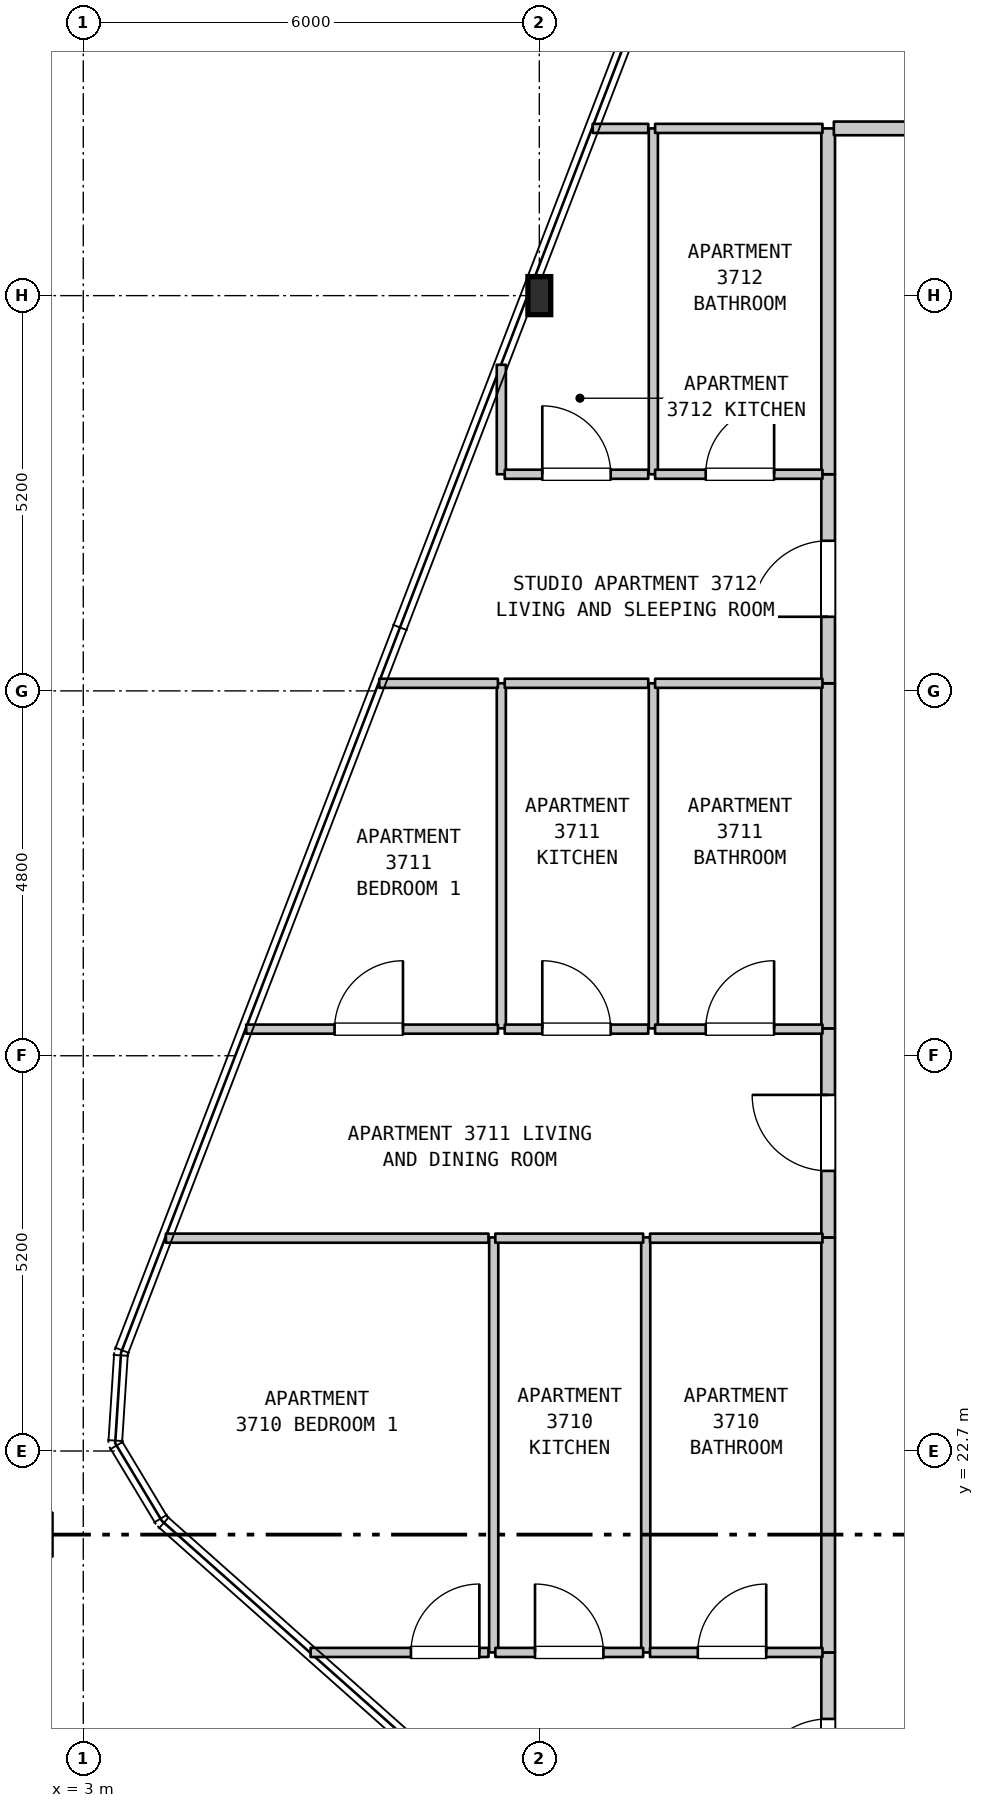
"""IFC4 building model, lengths in metres.
Left out: names, types, materials, properties, quantities, classifications, styles, units other than length and angle.
Written with IfcOpenShell. Run it as: python <this file> out.ifc"""

import sys

from ifc_helpers import new_model, si_unit, direction, frame, frame_2d, origin, origin_2d, place, context, subcontext, project, spatial, rectangle, i_section, extrude, element, fill, save


model = new_model("IFC4")
c1 = context("Model", 3, precision=1e-05, world=origin(), true_north=direction((0.0, 1.0)))
c2 = subcontext(c1, "Body", "Model", "MODEL_VIEW")
j1 = project(units=[si_unit("LENGTHUNIT", "METRE"), si_unit("PLANEANGLEUNIT", "RADIAN")], contexts=[c1])
p1 = place(None, origin())
s1 = spatial("IfcSite", under=j1, at=p1, CompositionType="ELEMENT")
p2 = place(p1, origin())
s2 = spatial("IfcBuilding", under=s1, at=p2, CompositionType="ELEMENT")
p3 = place(p2, frame((0.0, 0.0, 152.0)))
s3 = spatial("IfcBuildingStorey", under=s2, at=p3, CompositionType="ELEMENT", Elevation=152.0)
p4 = place(p3, frame((9.0, 37.9, 0.0), z_axis=(0.0, 0.0, 1.0), x_axis=(1.0, 0.0, 0.0)))
e1 = element("IfcColumn", 1, at=p4, inside=s3, PredefinedType="COLUMN", context=c2, shape_type="SweptSolid", body=[
    extrude(i_section(OverallWidth=0.3, OverallDepth=0.5, WebThickness=0.014, FlangeThickness=0.028, FilletRadius=0.027, at=origin_2d()), origin(), (0.0, 0.0, 1.0), 3.7),
])
p5 = place(p3, frame((8.4, 20.05, 0.0), z_axis=(0.0, 0.0, 1.0), x_axis=(0.0, 1.0, 0.0)))
e2 = element("IfcWall", 2, at=p5, inside=s3, PredefinedType="PARTITIONING", context=c2, shape_type="SweptSolid", body=[
    extrude(rectangle(XDim=5.46, YDim=0.12, at=frame_2d((2.73, 0.0))), origin(), (0.0, 0.0, 1.0), 3.385),
])
p6 = place(p3, frame((8.5, 28.26, 0.0), z_axis=(0.0, 0.0, 1.0), x_axis=(0.0, 1.0, 0.0)))
e3 = element("IfcWall", 3, at=p6, inside=s3, PredefinedType="PARTITIONING", context=c2, shape_type="SweptSolid", body=[
    extrude(rectangle(XDim=4.54, YDim=0.12, at=frame_2d((2.27, 0.0))), origin(), (0.0, 0.0, 1.0), 3.385),
])
p7 = place(p3, frame((8.5, 35.55, 0.0), z_axis=(0.0, 0.0, 1.0), x_axis=(0.0, 1.0, 0.0)))
e4 = element("IfcWall", 4, at=p7, inside=s3, PredefinedType="PARTITIONING", context=c2, shape_type="SweptSolid", body=[
    extrude(rectangle(XDim=1.44, YDim=0.12, at=frame_2d((0.72, 0.0))), origin(), (0.0, 0.0, 1.0), 3.385),
])
p8 = place(p3, frame((10.4, 20.05, 0.0), z_axis=(0.0, 0.0, 1.0), x_axis=(0.0, 1.0, 0.0)))
e5 = element("IfcWall", 5, at=p8, inside=s3, PredefinedType="PARTITIONING", context=c2, shape_type="SweptSolid", body=[
    extrude(rectangle(XDim=5.46, YDim=0.12, at=frame_2d((2.73, 0.0))), origin(), (0.0, 0.0, 1.0), 3.385),
])
p9 = place(p3, frame((10.5, 28.26, 0.0), z_axis=(0.0, 0.0, 1.0), x_axis=(0.0, 1.0, 0.0)))
e6 = element("IfcWall", 6, at=p9, inside=s3, PredefinedType="PARTITIONING", context=c2, shape_type="SweptSolid", body=[
    extrude(rectangle(XDim=4.54, YDim=0.12, at=frame_2d((2.27, 0.0))), origin(), (0.0, 0.0, 1.0), 3.385),
])
p10 = place(p3, frame((10.5, 35.55, 0.0), z_axis=(0.0, 0.0, 1.0), x_axis=(0.0, 1.0, 0.0)))
e7 = element("IfcWall", 7, at=p10, inside=s3, PredefinedType="PARTITIONING", context=c2, shape_type="SweptSolid", body=[
    extrude(rectangle(XDim=4.55, YDim=0.12, at=frame_2d((2.275, 0.0))), origin(), (0.0, 0.0, 1.0), 3.385),
])
p11 = place(p3, frame((12.8, 17.3, 0.0), z_axis=(0.0, 0.0, 1.0), x_axis=(0.0, 1.0, 0.0)))
e8 = element("IfcWall", 8, at=p11, inside=s3, PredefinedType="STANDARD", context=c2, shape_type="SweptSolid", body=[
    extrude(rectangle(XDim=2.75, YDim=0.18, at=frame_2d((1.375, 0.0))), origin(), (0.0, 0.0, 1.0), 3.385),
])
p12 = place(p11, frame((0.875, 0.0, 0.0)))
e9 = element("IfcOpeningElement", 9, at=p12, cuts=e8, PredefinedType="OPENING", context=c2, shape_type="SweptSolid", body=[
    extrude(rectangle(XDim=1.0, YDim=2.15, at=frame_2d((0.5, 1.075))), frame((0.0, 0.1, 0.0), z_axis=(0.0, -1.0, 0.0), x_axis=(1.0, 0.0, 0.0)), (0.0, 0.0, 1.0), 0.2),
])
p13 = place(p3, frame((12.8, 20.05, 0.0), z_axis=(0.0, 0.0, 1.0), x_axis=(0.0, 1.0, 0.0)))
e10 = element("IfcWall", 10, at=p13, inside=s3, PredefinedType="STANDARD", context=c2, shape_type="SweptSolid", body=[
    extrude(rectangle(XDim=5.46, YDim=0.18, at=frame_2d((2.73, 0.0))), origin(), (0.0, 0.0, 1.0), 3.385),
])
p14 = place(p3, frame((12.8, 25.51, 0.0), z_axis=(0.0, 0.0, 1.0), x_axis=(0.0, 1.0, 0.0)))
e11 = element("IfcWall", 11, at=p14, inside=s3, PredefinedType="STANDARD", context=c2, shape_type="SweptSolid", body=[
    extrude(rectangle(XDim=2.75, YDim=0.18, at=frame_2d((1.375, 0.0))), origin(), (0.0, 0.0, 1.0), 3.385),
])
p15 = place(p14, frame((0.875, 0.0, 0.0)))
e12 = element("IfcOpeningElement", 12, at=p15, cuts=e11, PredefinedType="OPENING", context=c2, shape_type="SweptSolid", body=[
    extrude(rectangle(XDim=1.0, YDim=2.15, at=frame_2d((0.5, 1.075))), frame((0.0, 0.1, 0.0), z_axis=(0.0, -1.0, 0.0), x_axis=(1.0, 0.0, 0.0)), (0.0, 0.0, 1.0), 0.2),
])
p16 = place(p3, frame((12.8, 28.26, 0.0), z_axis=(0.0, 0.0, 1.0), x_axis=(0.0, 1.0, 0.0)))
e13 = element("IfcWall", 13, at=p16, inside=s3, PredefinedType="STANDARD", context=c2, shape_type="SweptSolid", body=[
    extrude(rectangle(XDim=4.54, YDim=0.18, at=frame_2d((2.27, 0.0))), origin(), (0.0, 0.0, 1.0), 3.385),
])
p17 = place(p3, frame((12.8, 32.8, 0.0), z_axis=(0.0, 0.0, 1.0), x_axis=(0.0, 1.0, 0.0)))
e14 = element("IfcWall", 14, at=p17, inside=s3, PredefinedType="STANDARD", context=c2, shape_type="SweptSolid", body=[
    extrude(rectangle(XDim=2.75, YDim=0.18, at=frame_2d((1.375, 0.0))), origin(), (0.0, 0.0, 1.0), 3.385),
])
p18 = place(p17, frame((0.875, 0.0, 0.0)))
e15 = element("IfcOpeningElement", 15, at=p18, cuts=e14, PredefinedType="OPENING", context=c2, shape_type="SweptSolid", body=[
    extrude(rectangle(XDim=1.0, YDim=2.15, at=frame_2d((0.5, 1.075))), frame((0.0, 0.1, 0.0), z_axis=(0.0, -1.0, 0.0), x_axis=(1.0, 0.0, 0.0)), (0.0, 0.0, 1.0), 0.2),
])
p19 = place(p3, frame((12.8, 35.55, 0.0), z_axis=(0.0, 0.0, 1.0), x_axis=(0.0, 1.0, 0.0)))
e16 = element("IfcWall", 16, at=p19, inside=s3, PredefinedType="STANDARD", context=c2, shape_type="SweptSolid", body=[
    extrude(rectangle(XDim=4.55, YDim=0.18, at=frame_2d((2.275, 0.0))), origin(), (0.0, 0.0, 1.0), 3.385),
])
p20 = place(p3, frame((5.991, 20.05, 0.0), z_axis=(0.0, 0.0, 1.0), x_axis=(1.0, 0.0, 0.0)))
e17 = element("IfcWall", 17, at=p20, inside=s3, PredefinedType="PARTITIONING", context=c2, shape_type="SweptSolid", body=[
    extrude(rectangle(XDim=2.34, YDim=0.12, at=frame_2d((1.17, 0.0))), origin(), (0.0, 0.0, 1.0), 3.385),
])
p21 = place(p20, frame((1.32, 0.0, 0.0)))
e18 = element("IfcOpeningElement", 18, at=p21, cuts=e17, PredefinedType="OPENING", context=c2, shape_type="SweptSolid", body=[
    extrude(rectangle(XDim=0.9, YDim=2.15, at=frame_2d((0.45, 1.075))), frame((0.0, 0.07, 0.0), z_axis=(0.0, -1.0, 0.0), x_axis=(1.0, 0.0, 0.0)), (0.0, 0.0, 1.0), 0.14),
])
p22 = place(p3, frame((8.421, 20.05, 0.0), z_axis=(0.0, 0.0, 1.0), x_axis=(1.0, 0.0, 0.0)))
e19 = element("IfcWall", 19, at=p22, inside=s3, PredefinedType="PARTITIONING", context=c2, shape_type="SweptSolid", body=[
    extrude(rectangle(XDim=1.945, YDim=0.12, at=frame_2d((0.973, 0.0))), origin(), (0.0, 0.0, 1.0), 3.385),
])
p23 = place(p22, frame((0.522, 0.0, 0.0)))
e20 = element("IfcOpeningElement", 20, at=p23, cuts=e19, PredefinedType="OPENING", context=c2, shape_type="SweptSolid", body=[
    extrude(rectangle(XDim=0.9, YDim=2.15, at=frame_2d((0.45, 1.075))), frame((0.0, 0.07, 0.0), z_axis=(0.0, -1.0, 0.0), x_axis=(1.0, 0.0, 0.0)), (0.0, 0.0, 1.0), 0.14),
])
p24 = place(p3, frame((10.456, 20.05, 0.0), z_axis=(0.0, 0.0, 1.0), x_axis=(1.0, 0.0, 0.0)))
e21 = element("IfcWall", 21, at=p24, inside=s3, PredefinedType="PARTITIONING", context=c2, shape_type="SweptSolid", body=[
    extrude(rectangle(XDim=2.269, YDim=0.12, at=frame_2d((1.135, 0.0))), origin(), (0.0, 0.0, 1.0), 3.385),
])
p25 = place(p24, frame((0.629, 0.0, 0.0)))
e22 = element("IfcOpeningElement", 22, at=p25, cuts=e21, PredefinedType="OPENING", context=c2, shape_type="SweptSolid", body=[
    extrude(rectangle(XDim=0.9, YDim=2.1, at=frame_2d((0.45, 1.05))), frame((0.0, 0.07, 0.0), z_axis=(0.0, -1.0, 0.0), x_axis=(1.0, 0.0, 0.0)), (0.0, 0.0, 1.0), 0.14),
])
p26 = place(p3, frame((4.087, 25.5, 0.0), z_axis=(0.0, 0.0, 1.0), x_axis=(1.0, 0.0, 0.0)))
e23 = element("IfcWall", 23, at=p26, inside=s3, PredefinedType="PARTITIONING", context=c2, shape_type="SweptSolid", body=[
    extrude(rectangle(XDim=4.244, YDim=0.12, at=frame_2d((2.122, 0.0))), origin(), (0.0, 0.0, 1.0), 3.385),
])
p27 = place(p3, frame((8.421, 25.5, 0.0), z_axis=(0.0, 0.0, 1.0), x_axis=(1.0, 0.0, 0.0)))
e24 = element("IfcWall", 24, at=p27, inside=s3, PredefinedType="PARTITIONING", context=c2, shape_type="SweptSolid", body=[
    extrude(rectangle(XDim=1.945, YDim=0.12, at=frame_2d((0.973, 0.0))), origin(), (0.0, 0.0, 1.0), 3.385),
])
p28 = place(p3, frame((10.456, 25.5, 0.0), z_axis=(0.0, 0.0, 1.0), x_axis=(1.0, 0.0, 0.0)))
e25 = element("IfcWall", 25, at=p28, inside=s3, PredefinedType="PARTITIONING", context=c2, shape_type="SweptSolid", body=[
    extrude(rectangle(XDim=2.269, YDim=0.12, at=frame_2d((1.135, 0.0))), origin(), (0.0, 0.0, 1.0), 3.385),
])
p29 = place(p3, frame((5.144, 28.25, 0.0), z_axis=(0.0, 0.0, 1.0), x_axis=(1.0, 0.0, 0.0)))
e26 = element("IfcWall", 26, at=p29, inside=s3, PredefinedType="PARTITIONING", context=c2, shape_type="SweptSolid", body=[
    extrude(rectangle(XDim=3.311, YDim=0.12, at=frame_2d((1.656, 0.0))), origin(), (0.0, 0.0, 1.0), 3.385),
])
p30 = place(p29, frame((1.162, 0.0, 0.0)))
e27 = element("IfcOpeningElement", 27, at=p30, cuts=e26, PredefinedType="OPENING", context=c2, shape_type="SweptSolid", body=[
    extrude(rectangle(XDim=0.9, YDim=2.15, at=frame_2d((0.45, 1.075))), frame((0.0, 0.07, 0.0), z_axis=(0.0, -1.0, 0.0), x_axis=(1.0, 0.0, 0.0)), (0.0, 0.0, 1.0), 0.14),
])
p31 = place(p3, frame((8.545, 28.25, 0.0), z_axis=(0.0, 0.0, 1.0), x_axis=(1.0, 0.0, 0.0)))
e28 = element("IfcWall", 28, at=p31, inside=s3, PredefinedType="PARTITIONING", context=c2, shape_type="SweptSolid", body=[
    extrude(rectangle(XDim=1.888, YDim=0.12, at=frame_2d((0.944, 0.0))), origin(), (0.0, 0.0, 1.0), 3.385),
])
p32 = place(p31, frame((0.494, 0.0, 0.0)))
e29 = element("IfcOpeningElement", 29, at=p32, cuts=e28, PredefinedType="OPENING", context=c2, shape_type="SweptSolid", body=[
    extrude(rectangle(XDim=0.9, YDim=2.15, at=frame_2d((0.45, 1.075))), frame((0.0, 0.07, 0.0), z_axis=(0.0, -1.0, 0.0), x_axis=(1.0, 0.0, 0.0)), (0.0, 0.0, 1.0), 0.14),
])
p33 = place(p3, frame((10.523, 28.25, 0.0), z_axis=(0.0, 0.0, 1.0), x_axis=(1.0, 0.0, 0.0)))
e30 = element("IfcWall", 30, at=p33, inside=s3, PredefinedType="PARTITIONING", context=c2, shape_type="SweptSolid", body=[
    extrude(rectangle(XDim=2.202, YDim=0.12, at=frame_2d((1.101, 0.0))), origin(), (0.0, 0.0, 1.0), 3.385),
])
p34 = place(p33, frame((0.666, 0.0, 0.0)))
e31 = element("IfcOpeningElement", 31, at=p34, cuts=e30, PredefinedType="OPENING", context=c2, shape_type="SweptSolid", body=[
    extrude(rectangle(XDim=0.9, YDim=2.1, at=frame_2d((0.45, 1.05))), frame((0.0, 0.07, 0.0), z_axis=(0.0, -1.0, 0.0), x_axis=(1.0, 0.0, 0.0)), (0.0, 0.0, 1.0), 0.14),
])
p35 = place(p3, frame((6.894, 32.8, 0.0), z_axis=(0.0, 0.0, 1.0), x_axis=(1.0, 0.0, 0.0)))
e32 = element("IfcWall", 32, at=p35, inside=s3, PredefinedType="PARTITIONING", context=c2, shape_type="SweptSolid", body=[
    extrude(rectangle(XDim=1.561, YDim=0.12, at=frame_2d((0.781, 0.0))), origin(), (0.0, 0.0, 1.0), 3.385),
])
p36 = place(p3, frame((8.545, 32.8, 0.0), z_axis=(0.0, 0.0, 1.0), x_axis=(1.0, 0.0, 0.0)))
e33 = element("IfcWall", 33, at=p36, inside=s3, PredefinedType="PARTITIONING", context=c2, shape_type="SweptSolid", body=[
    extrude(rectangle(XDim=1.888, YDim=0.12, at=frame_2d((0.944, 0.0))), origin(), (0.0, 0.0, 1.0), 3.385),
])
p37 = place(p3, frame((10.523, 32.8, 0.0), z_axis=(0.0, 0.0, 1.0), x_axis=(1.0, 0.0, 0.0)))
e34 = element("IfcWall", 34, at=p37, inside=s3, PredefinedType="PARTITIONING", context=c2, shape_type="SweptSolid", body=[
    extrude(rectangle(XDim=2.202, YDim=0.12, at=frame_2d((1.101, 0.0))), origin(), (0.0, 0.0, 1.0), 3.385),
])
p38 = place(p3, frame((8.545, 35.55, 0.0), z_axis=(0.0, 0.0, 1.0), x_axis=(1.0, 0.0, 0.0)))
e35 = element("IfcWall", 35, at=p38, inside=s3, PredefinedType="PARTITIONING", context=c2, shape_type="SweptSolid", body=[
    extrude(rectangle(XDim=1.888, YDim=0.12, at=frame_2d((0.944, 0.0))), origin(), (0.0, 0.0, 1.0), 3.385),
])
p39 = place(p38, frame((0.494, 0.0, 0.0)))
e36 = element("IfcOpeningElement", 36, at=p39, cuts=e35, PredefinedType="OPENING", context=c2, shape_type="SweptSolid", body=[
    extrude(rectangle(XDim=0.9, YDim=2.15, at=frame_2d((0.45, 1.075))), frame((0.0, 0.07, 0.0), z_axis=(0.0, -1.0, 0.0), x_axis=(1.0, 0.0, 0.0)), (0.0, 0.0, 1.0), 0.14),
])
p40 = place(p3, frame((10.523, 35.55, 0.0), z_axis=(0.0, 0.0, 1.0), x_axis=(1.0, 0.0, 0.0)))
e37 = element("IfcWall", 37, at=p40, inside=s3, PredefinedType="PARTITIONING", context=c2, shape_type="SweptSolid", body=[
    extrude(rectangle(XDim=2.202, YDim=0.12, at=frame_2d((1.101, 0.0))), origin(), (0.0, 0.0, 1.0), 3.385),
])
p41 = place(p40, frame((0.666, 0.0, 0.0)))
e38 = element("IfcOpeningElement", 38, at=p41, cuts=e37, PredefinedType="OPENING", context=c2, shape_type="SweptSolid", body=[
    extrude(rectangle(XDim=0.9, YDim=2.1, at=frame_2d((0.45, 1.05))), frame((0.0, 0.07, 0.0), z_axis=(0.0, -1.0, 0.0), x_axis=(1.0, 0.0, 0.0)), (0.0, 0.0, 1.0), 0.14),
])
p42 = place(p3, frame((9.702, 40.1, 0.0), z_axis=(0.0, 0.0, 1.0), x_axis=(1.0, 0.0, 0.0)))
e39 = element("IfcWall", 39, at=p42, inside=s3, PredefinedType="PARTITIONING", context=c2, shape_type="SweptSolid", body=[
    extrude(rectangle(XDim=0.731, YDim=0.12, at=frame_2d((0.366, 0.0))), origin(), (0.0, 0.0, 1.0), 3.385),
])
p43 = place(p3, frame((10.523, 40.1, 0.0), z_axis=(0.0, 0.0, 1.0), x_axis=(1.0, 0.0, 0.0)))
e40 = element("IfcWall", 40, at=p43, inside=s3, PredefinedType="PARTITIONING", context=c2, shape_type="SweptSolid", body=[
    extrude(rectangle(XDim=2.202, YDim=0.12, at=frame_2d((1.101, 0.0))), origin(), (0.0, 0.0, 1.0), 3.385),
])
p44 = place(p3, frame((12.875, 40.1, 0.0), z_axis=(0.0, 0.0, 1.0), x_axis=(1.0, 0.0, 0.0)))
e41 = element("IfcWall", 41, at=p44, inside=s3, PredefinedType="STANDARD", context=c2, shape_type="SweptSolid", body=[
    extrude(rectangle(XDim=1.78, YDim=0.18, at=frame_2d((0.89, 0.0))), origin(), (0.0, 0.0, 1.0), 3.385),
])
p45 = place(p12, origin())
e42 = element("IfcDoor", 42, at=p45, inside=s3, OperationType="SINGLE_SWING_LEFT", PredefinedType="DOOR", context=c2, shape_type="SweptSolid", body=[
    extrude(rectangle(XDim=1.0, YDim=2.15, at=frame_2d((0.5, 1.075))), frame((0.0, 0.025, 0.0), z_axis=(0.0, -1.0, 0.0), x_axis=(1.0, 0.0, 0.0)), (0.0, 0.0, 1.0), 0.05),
])
fill(e9, e42)
p46 = place(p15, origin())
e43 = element("IfcDoor", 43, at=p46, inside=s3, OperationType="SINGLE_SWING_RIGHT", PredefinedType="DOOR", context=c2, shape_type="SweptSolid", body=[
    extrude(rectangle(XDim=1.0, YDim=2.15, at=frame_2d((0.5, 1.075))), frame((0.0, 0.025, 0.0), z_axis=(0.0, -1.0, 0.0), x_axis=(1.0, 0.0, 0.0)), (0.0, 0.0, 1.0), 0.05),
])
fill(e12, e43)
p47 = place(p18, origin())
e44 = element("IfcDoor", 44, at=p47, inside=s3, OperationType="SINGLE_SWING_LEFT", PredefinedType="DOOR", context=c2, shape_type="SweptSolid", body=[
    extrude(rectangle(XDim=1.0, YDim=2.15, at=frame_2d((0.5, 1.075))), frame((0.0, 0.025, 0.0), z_axis=(0.0, -1.0, 0.0), x_axis=(1.0, 0.0, 0.0)), (0.0, 0.0, 1.0), 0.05),
])
fill(e15, e44)
p48 = place(p21, origin())
e45 = element("IfcDoor", 45, at=p48, inside=s3, OperationType="SINGLE_SWING_RIGHT", PredefinedType="DOOR", context=c2, shape_type="SweptSolid", body=[
    extrude(rectangle(XDim=0.9, YDim=2.15, at=frame_2d((0.45, 1.075))), frame((0.0, 0.025, 0.0), z_axis=(0.0, -1.0, 0.0), x_axis=(1.0, 0.0, 0.0)), (0.0, 0.0, 1.0), 0.05),
])
fill(e18, e45)
p49 = place(p23, origin())
e46 = element("IfcDoor", 46, at=p49, inside=s3, OperationType="SINGLE_SWING_LEFT", PredefinedType="DOOR", context=c2, shape_type="SweptSolid", body=[
    extrude(rectangle(XDim=0.9, YDim=2.15, at=frame_2d((0.45, 1.075))), frame((0.0, 0.025, 0.0), z_axis=(0.0, -1.0, 0.0), x_axis=(1.0, 0.0, 0.0)), (0.0, 0.0, 1.0), 0.05),
])
fill(e20, e46)
p50 = place(p25, origin())
e47 = element("IfcDoor", 47, at=p50, inside=s3, OperationType="SINGLE_SWING_RIGHT", PredefinedType="DOOR", context=c2, shape_type="SweptSolid", body=[
    extrude(rectangle(XDim=0.9, YDim=2.1, at=frame_2d((0.45, 1.05))), frame((0.0, 0.025, 0.0), z_axis=(0.0, -1.0, 0.0), x_axis=(1.0, 0.0, 0.0)), (0.0, 0.0, 1.0), 0.05),
])
fill(e22, e47)
p51 = place(p30, origin())
e48 = element("IfcDoor", 48, at=p51, inside=s3, OperationType="SINGLE_SWING_RIGHT", PredefinedType="DOOR", context=c2, shape_type="SweptSolid", body=[
    extrude(rectangle(XDim=0.9, YDim=2.15, at=frame_2d((0.45, 1.075))), frame((0.0, 0.025, 0.0), z_axis=(0.0, -1.0, 0.0), x_axis=(1.0, 0.0, 0.0)), (0.0, 0.0, 1.0), 0.05),
])
fill(e27, e48)
p52 = place(p32, origin())
e49 = element("IfcDoor", 49, at=p52, inside=s3, OperationType="SINGLE_SWING_LEFT", PredefinedType="DOOR", context=c2, shape_type="SweptSolid", body=[
    extrude(rectangle(XDim=0.9, YDim=2.15, at=frame_2d((0.45, 1.075))), frame((0.0, 0.025, 0.0), z_axis=(0.0, -1.0, 0.0), x_axis=(1.0, 0.0, 0.0)), (0.0, 0.0, 1.0), 0.05),
])
fill(e29, e49)
p53 = place(p34, origin())
e50 = element("IfcDoor", 50, at=p53, inside=s3, OperationType="SINGLE_SWING_RIGHT", PredefinedType="DOOR", context=c2, shape_type="SweptSolid", body=[
    extrude(rectangle(XDim=0.9, YDim=2.1, at=frame_2d((0.45, 1.05))), frame((0.0, 0.025, 0.0), z_axis=(0.0, -1.0, 0.0), x_axis=(1.0, 0.0, 0.0)), (0.0, 0.0, 1.0), 0.05),
])
fill(e31, e50)
p54 = place(p39, origin())
e51 = element("IfcDoor", 51, at=p54, inside=s3, OperationType="SINGLE_SWING_LEFT", PredefinedType="DOOR", context=c2, shape_type="SweptSolid", body=[
    extrude(rectangle(XDim=0.9, YDim=2.15, at=frame_2d((0.45, 1.075))), frame((0.0, 0.025, 0.0), z_axis=(0.0, -1.0, 0.0), x_axis=(1.0, 0.0, 0.0)), (0.0, 0.0, 1.0), 0.05),
])
fill(e36, e51)
p55 = place(p41, origin())
e52 = element("IfcDoor", 52, at=p55, inside=s3, OperationType="SINGLE_SWING_RIGHT", PredefinedType="DOOR", context=c2, shape_type="SweptSolid", body=[
    extrude(rectangle(XDim=0.9, YDim=2.1, at=frame_2d((0.45, 1.05))), frame((0.0, 0.025, 0.0), z_axis=(0.0, -1.0, 0.0), x_axis=(1.0, 0.0, 0.0)), (0.0, 0.0, 1.0), 0.05),
])
fill(e38, e52)
save(model, sys.argv[1])
